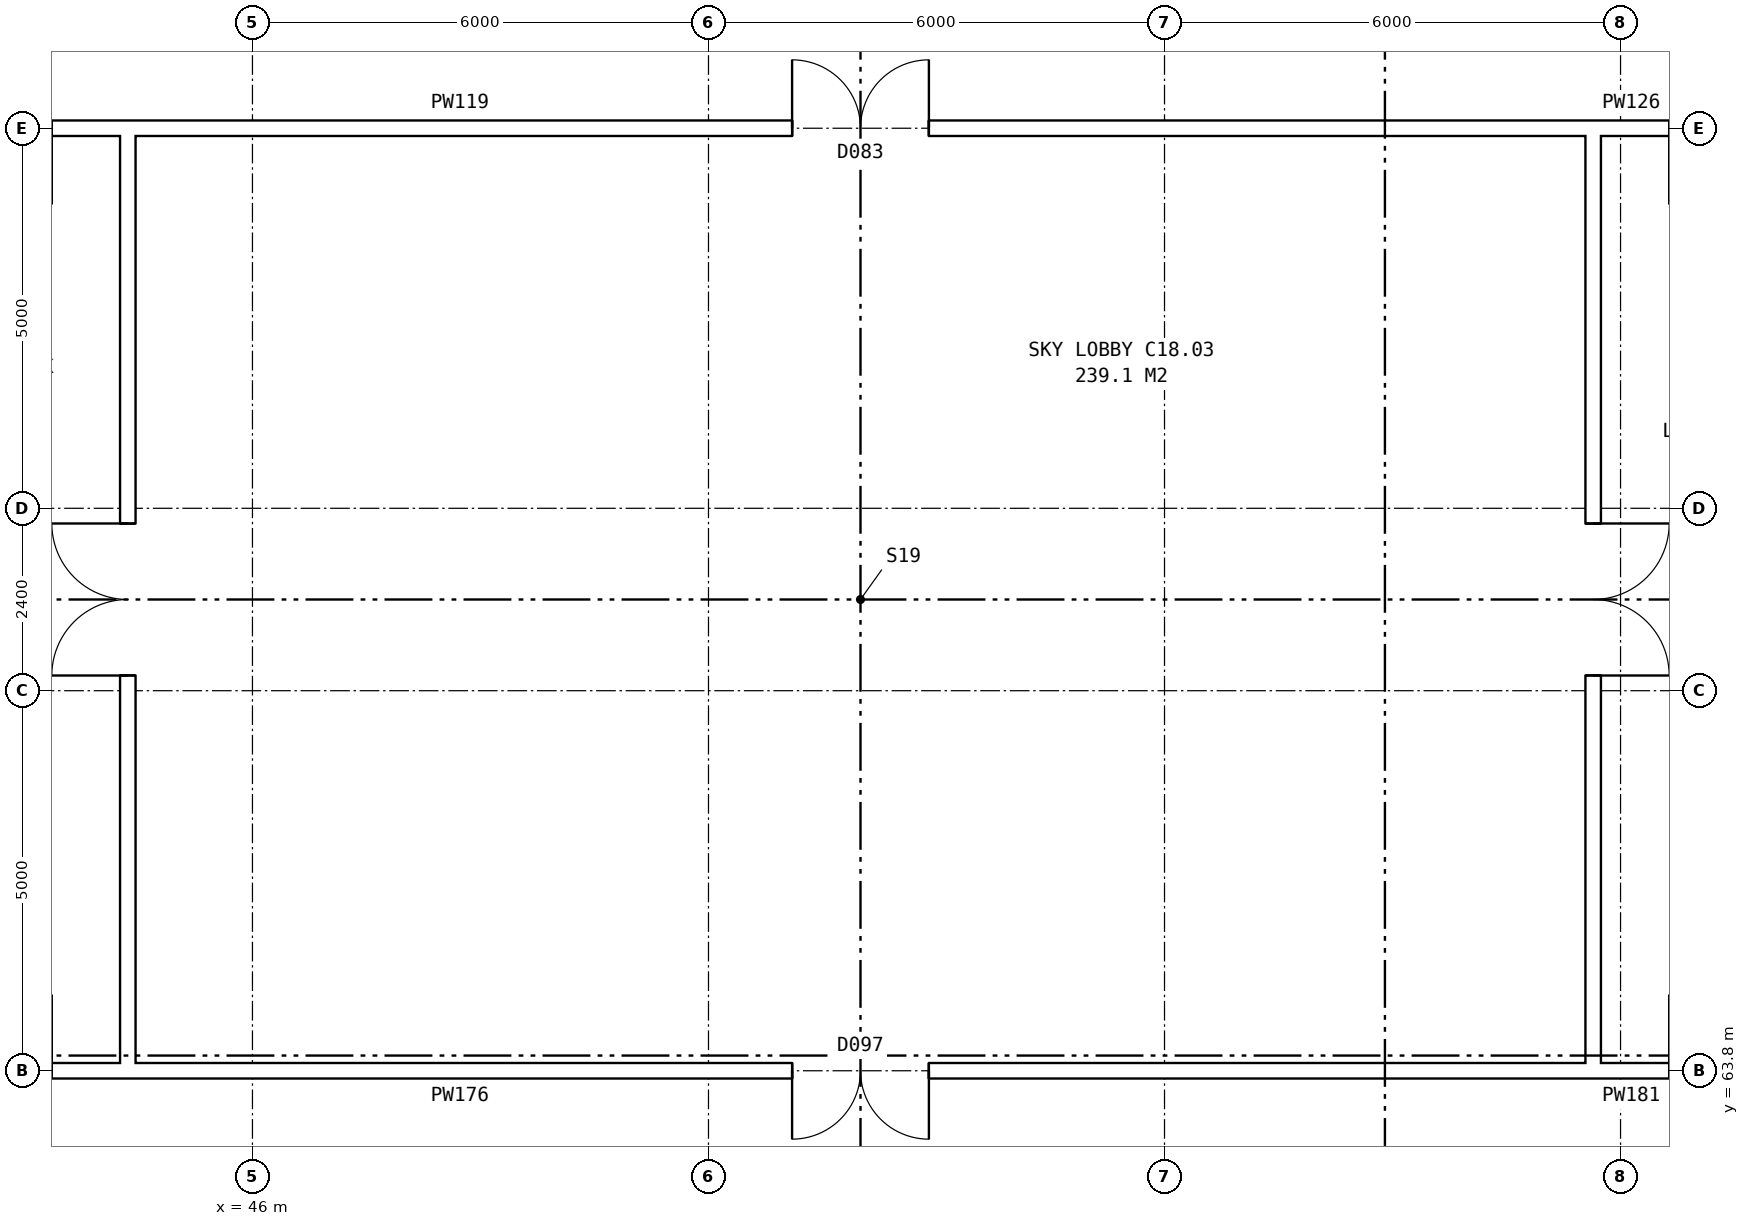
"""IFC4 building model, lengths in metres.
Left out: names, types, materials, properties, quantities, classifications, styles, units other than length and angle.
Written with IfcOpenShell. Run it as: python <this file> out.ifc"""

import sys

from ifc_helpers import new_model, si_unit, direction, frame, frame_2d, origin, place, context, subcontext, project, spatial, rectangle, extrude, element, fill, save


model = new_model("IFC4")
c1 = context("Model", 3, precision=1e-05, world=origin(), true_north=direction((0.0, 1.0)))
c2 = subcontext(c1, "Body", "Model", "MODEL_VIEW")
j1 = project(units=[si_unit("LENGTHUNIT", "METRE"), si_unit("PLANEANGLEUNIT", "RADIAN")], contexts=[c1])
p1 = place(None, origin())
s1 = spatial("IfcSite", under=j1, at=p1, CompositionType="ELEMENT")
p2 = place(p1, origin())
s2 = spatial("IfcBuilding", under=s1, at=p2, CompositionType="ELEMENT")
p3 = place(p2, frame((0.0, 0.0, 67.4)))
s3 = spatial("IfcBuildingStorey", under=s2, at=p3, CompositionType="ELEMENT", Elevation=67.4)
p4 = place(p3, frame((63.64, 63.9, 0.0), z_axis=(0.0, 0.0, 1.0), x_axis=(0.0, 1.0, 0.0)))
e1 = element("IfcWall", 1, at=p4, inside=s3, PredefinedType="PARTITIONING", context=c2, shape_type="SweptSolid", body=[
    extrude(rectangle(XDim=12.2, YDim=0.2, at=frame_2d((6.1, 0.0))), origin(), (0.0, 0.0, 1.0), 3.6),
])
p5 = place(p4, frame((5.1, 0.0, 0.0)))
e2 = element("IfcOpeningElement", 2, at=p5, cuts=e1, PredefinedType="OPENING", context=c2, shape_type="SweptSolid", body=[
    extrude(rectangle(XDim=2.0, YDim=2.1, at=frame_2d((1.0, 1.05))), frame((0.0, 0.11, 0.0), z_axis=(0.0, -1.0, 0.0), x_axis=(1.0, 0.0, 0.0)), (0.0, 0.0, 1.0), 0.22),
])
p6 = place(p3, frame((44.36, 63.9, 0.0), z_axis=(0.0, 0.0, 1.0), x_axis=(0.0, 1.0, 0.0)))
e3 = element("IfcWall", 3, at=p6, inside=s3, PredefinedType="PARTITIONING", context=c2, shape_type="SweptSolid", body=[
    extrude(rectangle(XDim=12.2, YDim=0.2, at=frame_2d((6.1, 0.0))), origin(), (0.0, 0.0, 1.0), 3.6),
])
p7 = place(p6, frame((5.1, 0.0, 0.0)))
e4 = element("IfcOpeningElement", 4, at=p7, cuts=e3, PredefinedType="OPENING", context=c2, shape_type="SweptSolid", body=[
    extrude(rectangle(XDim=2.0, YDim=2.1, at=frame_2d((1.0, 1.05))), frame((0.0, 0.11, 0.0), z_axis=(0.0, -1.0, 0.0), x_axis=(1.0, 0.0, 0.0)), (0.0, 0.0, 1.0), 0.22),
])
p8 = place(p3, frame((44.36, 63.8, 0.0), z_axis=(0.0, 0.0, 1.0), x_axis=(1.0, 0.0, 0.0)))
e5 = element("IfcWall", 5, at=p8, inside=s3, PredefinedType="PARTITIONING", context=c2, shape_type="SweptSolid", body=[
    extrude(rectangle(XDim=19.28, YDim=0.2, at=frame_2d((9.64, 0.0))), origin(), (0.0, 0.0, 1.0), 3.6),
])
p9 = place(p8, frame((8.74, 0.0, 0.0)))
e6 = element("IfcOpeningElement", 6, at=p9, cuts=e5, PredefinedType="OPENING", context=c2, shape_type="SweptSolid", body=[
    extrude(rectangle(XDim=1.8, YDim=2.1, at=frame_2d((0.9, 1.05))), frame((0.0, 0.11, 0.0), z_axis=(0.0, -1.0, 0.0), x_axis=(1.0, 0.0, 0.0)), (0.0, 0.0, 1.0), 0.22),
])
p10 = place(p3, frame((41.36, 63.8, 0.0), z_axis=(0.0, 0.0, 1.0), x_axis=(1.0, 0.0, 0.0)))
e7 = element("IfcWall", 7, at=p10, inside=s3, PredefinedType="PARTITIONING", context=c2, shape_type="SweptSolid", body=[
    extrude(rectangle(XDim=3.0, YDim=0.2, at=frame_2d((1.5, 0.0))), origin(), (0.0, 0.0, 1.0), 3.6),
])
p11 = place(p10, frame((1.0, 0.0, 0.0)))
e8 = element("IfcOpeningElement", 8, at=p11, cuts=e7, PredefinedType="OPENING", context=c2, shape_type="SweptSolid", body=[
    extrude(rectangle(XDim=1.0, YDim=2.1, at=frame_2d((0.5, 1.05))), frame((0.0, 0.11, 0.0), z_axis=(0.0, -1.0, 0.0), x_axis=(1.0, 0.0, 0.0)), (0.0, 0.0, 1.0), 0.22),
])
p12 = place(p3, frame((63.64, 63.8, 0.0), z_axis=(0.0, 0.0, 1.0), x_axis=(1.0, 0.0, 0.0)))
e9 = element("IfcWall", 9, at=p12, inside=s3, PredefinedType="PARTITIONING", context=c2, shape_type="SweptSolid", body=[
    extrude(rectangle(XDim=3.0, YDim=0.2, at=frame_2d((1.5, 0.0))), origin(), (0.0, 0.0, 1.0), 3.6),
])
p13 = place(p12, frame((1.0, 0.0, 0.0)))
e10 = element("IfcOpeningElement", 10, at=p13, cuts=e9, PredefinedType="OPENING", context=c2, shape_type="SweptSolid", body=[
    extrude(rectangle(XDim=1.0, YDim=2.1, at=frame_2d((0.5, 1.05))), frame((0.0, 0.11, 0.0), z_axis=(0.0, -1.0, 0.0), x_axis=(1.0, 0.0, 0.0)), (0.0, 0.0, 1.0), 0.22),
])
p14 = place(p3, frame((44.36, 76.2, 0.0), z_axis=(0.0, 0.0, 1.0), x_axis=(1.0, 0.0, 0.0)))
e11 = element("IfcWall", 11, at=p14, inside=s3, PredefinedType="PARTITIONING", context=c2, shape_type="SweptSolid", body=[
    extrude(rectangle(XDim=19.28, YDim=0.2, at=frame_2d((9.64, 0.0))), origin(), (0.0, 0.0, 1.0), 3.6),
])
p15 = place(p14, frame((8.74, 0.0, 0.0)))
e12 = element("IfcOpeningElement", 12, at=p15, cuts=e11, PredefinedType="OPENING", context=c2, shape_type="SweptSolid", body=[
    extrude(rectangle(XDim=1.8, YDim=2.1, at=frame_2d((0.9, 1.05))), frame((0.0, 0.11, 0.0), z_axis=(0.0, -1.0, 0.0), x_axis=(1.0, 0.0, 0.0)), (0.0, 0.0, 1.0), 0.22),
])
p16 = place(p3, frame((41.36, 76.2, 0.0), z_axis=(0.0, 0.0, 1.0), x_axis=(1.0, 0.0, 0.0)))
e13 = element("IfcWall", 13, at=p16, inside=s3, PredefinedType="PARTITIONING", context=c2, shape_type="SweptSolid", body=[
    extrude(rectangle(XDim=3.0, YDim=0.2, at=frame_2d((1.5, 0.0))), origin(), (0.0, 0.0, 1.0), 3.6),
])
p17 = place(p16, frame((1.0, 0.0, 0.0)))
e14 = element("IfcOpeningElement", 14, at=p17, cuts=e13, PredefinedType="OPENING", context=c2, shape_type="SweptSolid", body=[
    extrude(rectangle(XDim=1.0, YDim=2.1, at=frame_2d((0.5, 1.05))), frame((0.0, 0.11, 0.0), z_axis=(0.0, -1.0, 0.0), x_axis=(1.0, 0.0, 0.0)), (0.0, 0.0, 1.0), 0.22),
])
p18 = place(p3, frame((63.64, 76.2, 0.0), z_axis=(0.0, 0.0, 1.0), x_axis=(1.0, 0.0, 0.0)))
e15 = element("IfcWall", 15, at=p18, inside=s3, PredefinedType="PARTITIONING", context=c2, shape_type="SweptSolid", body=[
    extrude(rectangle(XDim=3.0, YDim=0.2, at=frame_2d((1.5, 0.0))), origin(), (0.0, 0.0, 1.0), 3.6),
])
p19 = place(p18, frame((1.0, 0.0, 0.0)))
e16 = element("IfcOpeningElement", 16, at=p19, cuts=e15, PredefinedType="OPENING", context=c2, shape_type="SweptSolid", body=[
    extrude(rectangle(XDim=1.0, YDim=2.1, at=frame_2d((0.5, 1.05))), frame((0.0, 0.11, 0.0), z_axis=(0.0, -1.0, 0.0), x_axis=(1.0, 0.0, 0.0)), (0.0, 0.0, 1.0), 0.22),
])
p20 = place(p5, frame((2.0, 0.0, 0.0), z_axis=(0.0, 0.0, 1.0), x_axis=(-1.0, 0.0, 0.0)))
e17 = element("IfcDoor", 17, at=p20, inside=s3, OperationType="DOUBLE_DOOR_SINGLE_SWING", PredefinedType="DOOR", context=c2, shape_type="SweptSolid", body=[
    extrude(rectangle(XDim=2.0, YDim=2.1, at=frame_2d((1.0, 1.05))), frame((0.0, 0.025, 0.0), z_axis=(0.0, -1.0, 0.0), x_axis=(1.0, 0.0, 0.0)), (0.0, 0.0, 1.0), 0.05),
])
fill(e2, e17)
p21 = place(p7, origin())
e18 = element("IfcDoor", 18, at=p21, inside=s3, OperationType="DOUBLE_DOOR_SINGLE_SWING", PredefinedType="DOOR", context=c2, shape_type="SweptSolid", body=[
    extrude(rectangle(XDim=2.0, YDim=2.1, at=frame_2d((1.0, 1.05))), frame((0.0, 0.025, 0.0), z_axis=(0.0, -1.0, 0.0), x_axis=(1.0, 0.0, 0.0)), (0.0, 0.0, 1.0), 0.05),
])
fill(e4, e18)
p22 = place(p9, frame((1.8, 0.0, 0.0), z_axis=(0.0, 0.0, 1.0), x_axis=(-1.0, 0.0, 0.0)))
e19 = element("IfcDoor", 19, at=p22, inside=s3, OperationType="DOUBLE_DOOR_SINGLE_SWING", PredefinedType="DOOR", context=c2, shape_type="SweptSolid", body=[
    extrude(rectangle(XDim=1.8, YDim=2.1, at=frame_2d((0.9, 1.05))), frame((0.0, 0.025, 0.0), z_axis=(0.0, -1.0, 0.0), x_axis=(1.0, 0.0, 0.0)), (0.0, 0.0, 1.0), 0.05),
])
fill(e6, e19)
p23 = place(p15, origin())
e20 = element("IfcDoor", 20, at=p23, inside=s3, OperationType="DOUBLE_DOOR_SINGLE_SWING", PredefinedType="DOOR", context=c2, shape_type="SweptSolid", body=[
    extrude(rectangle(XDim=1.8, YDim=2.1, at=frame_2d((0.9, 1.05))), frame((0.0, 0.025, 0.0), z_axis=(0.0, -1.0, 0.0), x_axis=(1.0, 0.0, 0.0)), (0.0, 0.0, 1.0), 0.05),
])
fill(e12, e20)
save(model, sys.argv[1])
